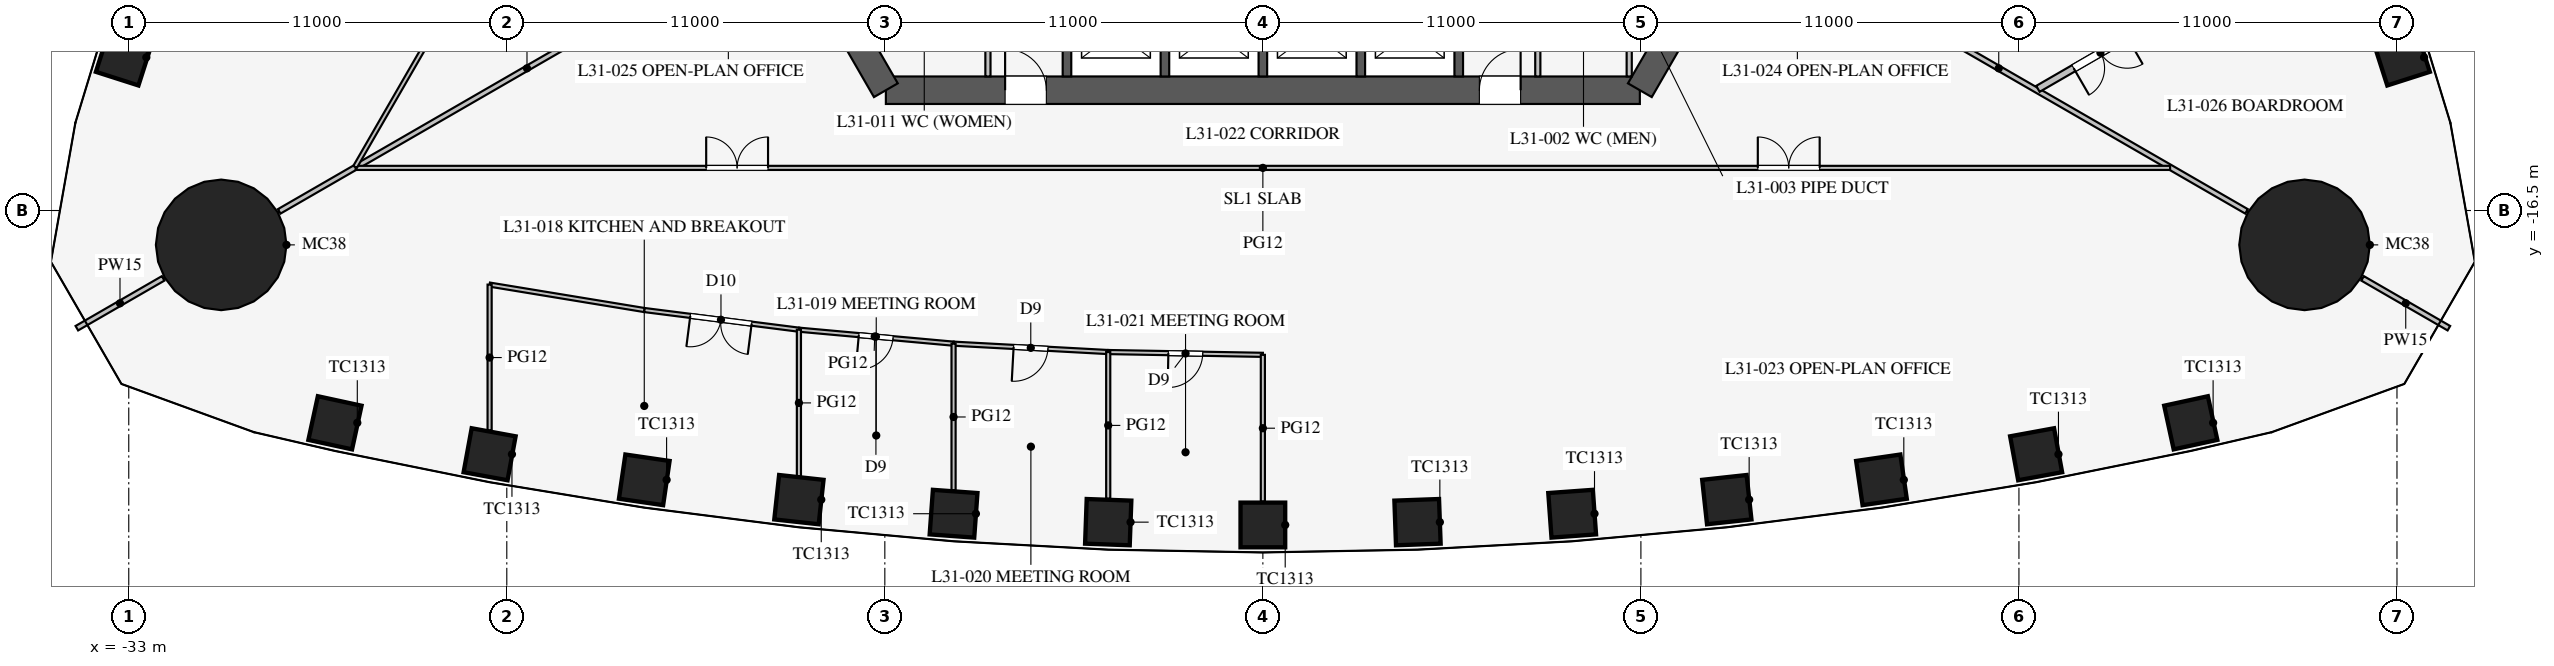
"""IFC4 building model, lengths in metres.
Left out: names, types, materials, properties, quantities, classifications, styles, units other than length and angle.
Written with IfcOpenShell. Run it as: python <this file> out.ifc"""

import sys

from ifc_helpers import new_model, si_unit, direction, frame, frame_2d, origin, origin_2d, place, context, subcontext, project, spatial, rectangle, circle, extrude, element, fill, save


model = new_model("IFC4")
c1 = context("Model", 3, precision=1e-05, world=origin(), true_north=direction((0.0, 1.0)))
c2 = subcontext(c1, "Body", "Model", "MODEL_VIEW")
j1 = project(units=[si_unit("LENGTHUNIT", "METRE"), si_unit("PLANEANGLEUNIT", "RADIAN")], contexts=[c1])
p1 = place(None, origin())
s1 = spatial("IfcSite", under=j1, at=p1, CompositionType="ELEMENT")
p2 = place(p1, origin())
s2 = spatial("IfcBuilding", under=s1, at=p2, CompositionType="ELEMENT")
p3 = place(p2, frame((0.0, 0.0, 136.7)))
s3 = spatial("IfcBuildingStorey", under=s2, at=p3, CompositionType="ELEMENT", Elevation=136.7)
for number, where, z_axis, x_axis in (
    (1, (-27.0, -22.677, 0.0), (0.0, 0.0, 1.0), (0.977, -0.212, 0.0)),
    (2, (-22.5, -23.593, 0.0), (0.0, 0.0, 1.0), (0.984, -0.18, 0.0)),
    (3, (-18.0, -24.337, 0.0), (0.0, 0.0, 1.0), (0.99, -0.144, 0.0)),
    (4, (-13.5, -24.913, 0.0), (0.0, 0.0, 1.0), (0.994, -0.108, 0.0)),
    (5, (-9.0, -25.323, 0.0), (0.0, 0.0, 1.0), (0.997, -0.072, 0.0)),
    (6, (-4.5, -25.568, 0.0), (0.0, 0.0, 1.0), (0.999, -0.036, 0.0)),
    (7, (0.0, -25.65, 0.0), (0.0, 0.0, 1.0), (1.0, 0.0, 0.0)),
    (8, (4.5, -25.568, 0.0), (0.0, 0.0, 1.0), (0.999, 0.036, 0.0)),
    (9, (9.0, -25.323, 0.0), (0.0, 0.0, 1.0), (0.997, 0.072, 0.0)),
    (10, (13.5, -24.913, 0.0), (0.0, 0.0, 1.0), (0.994, 0.108, 0.0)),
    (11, (18.0, -24.337, 0.0), (0.0, 0.0, 1.0), (0.99, 0.144, 0.0)),
    (12, (22.5, -23.593, 0.0), (0.0, 0.0, 1.0), (0.984, 0.18, 0.0)),
    (13, (27.0, -22.677, 0.0), (0.0, 0.0, 1.0), (0.977, 0.212, 0.0)),
    (14, (33.139, -12.044, 0.0), (0.0, 0.0, 1.0), (-0.305, 0.952, 0.0)),
    (15, (-33.139, -12.044, 0.0), (0.0, 0.0, 1.0), (-0.305, -0.952, 0.0)),
):
    element("IfcColumn", number, at=place(p3, frame(where, z_axis=z_axis, x_axis=x_axis)), inside=s3, PredefinedType="COLUMN", context=c2, shape_type="SweptSolid", body=[
        extrude(rectangle(XDim=1.3, YDim=1.3, at=origin_2d()), origin(), (0.0, 0.0, 1.0), 4.2),
    ])
for number, where, z_axis, x_axis in (
    (16, (30.311, -17.5, 0.0), (0.0, 0.0, 1.0), (1.0, 0.0, 0.0)),
    (17, (-30.311, -17.5, 0.0), (0.0, 0.0, 1.0), (1.0, 0.0, 0.0)),
):
    element("IfcColumn", number, at=place(p3, frame(where, z_axis=z_axis, x_axis=x_axis)), inside=s3, PredefinedType="COLUMN", context=c2, shape_type="SweptSolid", body=[
        extrude(circle(Radius=1.9, at=origin_2d()), origin(), (0.0, 0.0, 1.0), 4.2),
    ])
p4 = place(p3, frame((-10.97, -13.0, 0.0), z_axis=(0.0, 0.0, 1.0), x_axis=(1.0, 0.0, 0.0)))
e18 = element("IfcWall", 18, at=p4, inside=s3, PredefinedType="SHEAR", context=c2, shape_type="SweptSolid", body=[
    extrude(rectangle(XDim=21.939, YDim=0.8, at=frame_2d((10.97, 0.0))), origin(), (0.0, 0.0, 1.0), 4.2),
])
p5 = place(p4, frame((17.27, 0.0, 0.0)))
e19 = element("IfcOpeningElement", 19, at=p5, cuts=e18, PredefinedType="OPENING", context=c2, shape_type="SweptSolid", body=[
    extrude(rectangle(XDim=1.2, YDim=2.1, at=frame_2d((0.6, 1.05))), frame((0.0, 0.41, 0.0), z_axis=(0.0, -1.0, 0.0), x_axis=(1.0, 0.0, 0.0)), (0.0, 0.0, 1.0), 0.82),
])
p6 = place(p4, frame((3.47, 0.0, 0.0)))
e20 = element("IfcOpeningElement", 20, at=p6, cuts=e18, PredefinedType="OPENING", context=c2, shape_type="SweptSolid", body=[
    extrude(rectangle(XDim=1.2, YDim=2.1, at=frame_2d((0.6, 1.05))), frame((0.0, 0.41, 0.0), z_axis=(0.0, -1.0, 0.0), x_axis=(1.0, 0.0, 0.0)), (0.0, 0.0, 1.0), 0.82),
])
for number, where, z_axis, x_axis in (
    (21, (10.97, -13.0, 0.0), (0.0, 0.0, 1.0), (0.5, 0.866, 0.0)),
    (22, (-16.743, -3.0, 0.0), (0.0, 0.0, 1.0), (0.5, -0.866, 0.0)),
):
    element("IfcWall", number, at=place(p3, frame(where, z_axis=z_axis, x_axis=x_axis)), inside=s3, PredefinedType="SHEAR", context=c2, shape_type="SweptSolid", body=[
        extrude(rectangle(XDim=11.547, YDim=0.8, at=frame_2d((5.773, 0.0))), origin(), (0.0, 0.0, 1.0), 4.2),
    ])
for number, where, z_axis, x_axis in (
    (23, (-5.7, -10.025, 0.0), (0.0, 0.0, 1.0), (0.0, -1.0, 0.0)),
    (24, (-2.85, -10.025, 0.0), (0.0, 0.0, 1.0), (0.0, -1.0, 0.0)),
    (25, (0.0, -10.025, 0.0), (0.0, 0.0, 1.0), (0.0, -1.0, 0.0)),
    (26, (2.85, -10.025, 0.0), (0.0, 0.0, 1.0), (0.0, -1.0, 0.0)),
    (27, (5.7, -10.025, 0.0), (0.0, 0.0, 1.0), (0.0, -1.0, 0.0)),
):
    element("IfcWall", number, at=place(p3, frame(where, z_axis=z_axis, x_axis=x_axis)), inside=s3, PredefinedType="SHEAR", context=c2, shape_type="SweptSolid", body=[
        extrude(rectangle(XDim=2.575, YDim=0.25, at=frame_2d((1.288, 0.0))), origin(), (0.0, 0.0, 1.0), 4.2),
    ])
p7 = place(p3, frame((8.0, -7.5, 0.0), z_axis=(0.0, 0.0, 1.0), x_axis=(0.0, -1.0, 0.0)))
e28 = element("IfcWall", 28, at=p7, inside=s3, PredefinedType="PARTITIONING", context=c2, shape_type="SweptSolid", body=[
    extrude(rectangle(XDim=5.1, YDim=0.15, at=frame_2d((2.55, 0.0))), origin(), (0.0, 0.0, 1.0), 4.0),
])
p8 = place(p7, frame((1.3, 0.0, 0.0)))
e29 = element("IfcOpeningElement", 29, at=p8, cuts=e28, PredefinedType="OPENING", context=c2, shape_type="SweptSolid", body=[
    extrude(rectangle(XDim=0.9, YDim=2.1, at=frame_2d((0.45, 1.05))), frame((0.0, 0.085, 0.0), z_axis=(0.0, -1.0, 0.0), x_axis=(1.0, 0.0, 0.0)), (0.0, 0.0, 1.0), 0.17),
])
p9 = place(p3, frame((-8.0, -7.5, 0.0), z_axis=(0.0, 0.0, 1.0), x_axis=(0.0, -1.0, 0.0)))
e30 = element("IfcWall", 30, at=p9, inside=s3, PredefinedType="PARTITIONING", context=c2, shape_type="SweptSolid", body=[
    extrude(rectangle(XDim=5.1, YDim=0.15, at=frame_2d((2.55, 0.0))), origin(), (0.0, 0.0, 1.0), 4.0),
])
p10 = place(p9, frame((2.6, 0.0, 0.0)))
e31 = element("IfcOpeningElement", 31, at=p10, cuts=e30, PredefinedType="OPENING", context=c2, shape_type="SweptSolid", body=[
    extrude(rectangle(XDim=0.9, YDim=2.1, at=frame_2d((0.45, 1.05))), frame((0.0, 0.085, 0.0), z_axis=(0.0, -1.0, 0.0), x_axis=(1.0, 0.0, 0.0)), (0.0, 0.0, 1.0), 0.17),
])
p11 = place(p3, frame((10.66, -8.5, 0.0), z_axis=(0.0, 0.0, 1.0), x_axis=(0.0, -1.0, 0.0)))
e32 = element("IfcWall", 32, at=p11, inside=s3, PredefinedType="PARTITIONING", context=c2, shape_type="SweptSolid", body=[
    extrude(rectangle(XDim=4.1, YDim=0.15, at=frame_2d((2.05, 0.0))), origin(), (0.0, 0.0, 1.0), 4.0),
])
p12 = place(p3, frame((14.203, -8.2, 0.0), z_axis=(0.0, 0.0, 1.0), x_axis=(0.866024668836, -0.500001272966, 0.0)))
e33 = element("IfcWall", 33, at=p12, inside=s3, PredefinedType="PARTITIONING", context=c2, shape_type="SweptSolid", body=[
    extrude(rectangle(XDim=16.65, YDim=0.15, at=frame_2d((8.325, 0.0))), origin(), (0.0, 0.0, 1.0), 2.3),
])
p13 = place(p3, frame((32.0, -18.475, 0.0), z_axis=(0.0, 0.0, 1.0), x_axis=(0.866042548026, -0.499970304126, 0.0)))
e34 = element("IfcWall", 34, at=p13, inside=s3, PredefinedType="PARTITIONING", context=c2, shape_type="SweptSolid", body=[
    extrude(rectangle(XDim=2.899, YDim=0.15, at=frame_2d((1.45, 0.0))), origin(), (0.0, 0.0, 1.0), 2.3),
])
p14 = place(p3, frame((-14.203, -8.2, 0.0), z_axis=(0.0, 0.0, 1.0), x_axis=(-0.866024668836, -0.500001272966, 0.0)))
e35 = element("IfcWall", 35, at=p14, inside=s3, PredefinedType="PARTITIONING", context=c2, shape_type="SweptSolid", body=[
    extrude(rectangle(XDim=16.65, YDim=0.15, at=frame_2d((8.325, 0.0))), origin(), (0.0, 0.0, 1.0), 2.3),
])
p15 = place(p3, frame((-32.0, -18.475, 0.0), z_axis=(0.0, 0.0, 1.0), x_axis=(-0.866042548026, -0.499970304126, 0.0)))
e36 = element("IfcWall", 36, at=p15, inside=s3, PredefinedType="PARTITIONING", context=c2, shape_type="SweptSolid", body=[
    extrude(rectangle(XDim=2.899, YDim=0.15, at=frame_2d((1.45, 0.0))), origin(), (0.0, 0.0, 1.0), 2.3),
])
p16 = place(p3, frame((-26.398, -15.26, 0.0), z_axis=(0.0, 0.0, 1.0), x_axis=(1.0, 0.0, 0.0)))
e37 = element("IfcWall", 37, at=p16, inside=s3, PredefinedType="PARTITIONING", context=c2, shape_type="SweptSolid", body=[
    extrude(rectangle(XDim=52.796, YDim=0.12, at=frame_2d((26.398, 0.0))), origin(), (0.0, 0.0, 1.0), 2.9),
])
p17 = place(p16, frame((10.2, 0.0, 0.15)))
e38 = element("IfcOpeningElement", 38, at=p17, cuts=e37, PredefinedType="OPENING", context=c2, shape_type="SweptSolid", body=[
    extrude(rectangle(XDim=1.8, YDim=2.1, at=frame_2d((0.9, 1.05))), frame((0.0, 0.07, 0.0), z_axis=(0.0, -1.0, 0.0), x_axis=(1.0, 0.0, 0.0)), (0.0, 0.0, 1.0), 0.14),
])
p18 = place(p16, frame((40.8, 0.0, 0.15)))
e39 = element("IfcOpeningElement", 39, at=p18, cuts=e37, PredefinedType="OPENING", context=c2, shape_type="SweptSolid", body=[
    extrude(rectangle(XDim=1.8, YDim=2.1, at=frame_2d((0.9, 1.05))), frame((0.0, 0.07, 0.0), z_axis=(0.0, -1.0, 0.0), x_axis=(1.0, 0.0, 0.0)), (0.0, 0.0, 1.0), 0.14),
])
p19 = place(p3, frame((-13.5, -19.968, 0.0), z_axis=(0.0, 0.0, 1.0), x_axis=(0.995930325215, -0.090126507295, 0.0)))
e40 = element("IfcWall", 40, at=p19, inside=s3, PredefinedType="PARTITIONING", context=c2, shape_type="SweptSolid", body=[
    extrude(rectangle(XDim=4.518, YDim=0.12, at=frame_2d((2.259, 0.0))), origin(), (0.0, 0.0, 1.0), 2.9),
])
p20 = place(p19, frame((1.75, 0.0, 0.15)))
e41 = element("IfcOpeningElement", 41, at=p20, cuts=e40, PredefinedType="OPENING", context=c2, shape_type="SweptSolid", body=[
    extrude(rectangle(XDim=1.0, YDim=2.1, at=frame_2d((0.5, 1.05))), frame((0.0, 0.07, 0.0), z_axis=(0.0, -1.0, 0.0), x_axis=(1.0, 0.0, 0.0)), (0.0, 0.0, 1.0), 0.14),
])
p21 = place(p3, frame((-18.0, -19.396, 0.0), z_axis=(0.0, 0.0, 1.0), x_axis=(0.992010652594, -0.12615413247, 0.0)))
e42 = element("IfcWall", 42, at=p21, inside=s3, PredefinedType="PARTITIONING", context=c2, shape_type="SweptSolid", body=[
    extrude(rectangle(XDim=4.536, YDim=0.12, at=frame_2d((2.268, 0.0))), origin(), (0.0, 0.0, 1.0), 2.9),
])
p22 = place(p21, frame((1.35, 0.0, 0.15)))
e43 = element("IfcOpeningElement", 43, at=p22, cuts=e42, PredefinedType="OPENING", context=c2, shape_type="SweptSolid", body=[
    extrude(rectangle(XDim=1.8, YDim=2.1, at=frame_2d((0.9, 1.05))), frame((0.0, 0.07, 0.0), z_axis=(0.0, -1.0, 0.0), x_axis=(1.0, 0.0, 0.0)), (0.0, 0.0, 1.0), 0.14),
])
p23 = place(p3, frame((-22.5, -18.656, 0.0), z_axis=(0.0, 0.0, 1.0), x_axis=(0.986764681833, -0.162158757664, 0.0)))
e44 = element("IfcWall", 44, at=p23, inside=s3, PredefinedType="PARTITIONING", context=c2, shape_type="SweptSolid", body=[
    extrude(rectangle(XDim=4.56, YDim=0.12, at=frame_2d((2.28, 0.0))), origin(), (0.0, 0.0, 1.0), 2.9),
])
p24 = place(p3, frame((-4.5, -20.619, 0.0), z_axis=(0.0, 0.0, 1.0), x_axis=(0.999837820638, -0.018009231578, 0.0)))
e45 = element("IfcWall", 45, at=p24, inside=s3, PredefinedType="PARTITIONING", context=c2, shape_type="SweptSolid", body=[
    extrude(rectangle(XDim=4.501, YDim=0.12, at=frame_2d((2.25, 0.0))), origin(), (0.0, 0.0, 1.0), 2.9),
])
p25 = place(p24, frame((1.75, 0.0, 0.15)))
e46 = element("IfcOpeningElement", 46, at=p25, cuts=e45, PredefinedType="OPENING", context=c2, shape_type="SweptSolid", body=[
    extrude(rectangle(XDim=1.0, YDim=2.1, at=frame_2d((0.5, 1.05))), frame((0.0, 0.07, 0.0), z_axis=(0.0, -1.0, 0.0), x_axis=(1.0, 0.0, 0.0)), (0.0, 0.0, 1.0), 0.14),
])
p26 = place(p3, frame((-9.0, -20.375, 0.0), z_axis=(0.0, 0.0, 1.0), x_axis=(0.998537376538, -0.054065771581, 0.0)))
e47 = element("IfcWall", 47, at=p26, inside=s3, PredefinedType="PARTITIONING", context=c2, shape_type="SweptSolid", body=[
    extrude(rectangle(XDim=4.507, YDim=0.12, at=frame_2d((2.253, 0.0))), origin(), (0.0, 0.0, 1.0), 2.9),
])
p27 = place(p26, frame((1.75, 0.0, 0.15)))
e48 = element("IfcOpeningElement", 48, at=p27, cuts=e47, PredefinedType="OPENING", context=c2, shape_type="SweptSolid", body=[
    extrude(rectangle(XDim=1.0, YDim=2.1, at=frame_2d((0.5, 1.05))), frame((0.0, 0.07, 0.0), z_axis=(0.0, -1.0, 0.0), x_axis=(1.0, 0.0, 0.0)), (0.0, 0.0, 1.0), 0.14),
])
p28 = place(p3, frame((0.0, -20.7, 0.0), z_axis=(0.0, 0.0, 1.0), x_axis=(0.0, -1.0, 0.0)))
e49 = element("IfcWall", 49, at=p28, inside=s3, PredefinedType="PARTITIONING", context=c2, shape_type="SweptSolid", body=[
    extrude(rectangle(XDim=4.27, YDim=0.12, at=frame_2d((2.135, 0.0))), origin(), (0.0, 0.0, 1.0), 2.9),
])
p29 = place(p3, frame((-13.5, -19.968, 0.0), z_axis=(0.0, 0.0, 1.0), x_axis=(0.0, -1.0, 0.0)))
e50 = element("IfcWall", 50, at=p29, inside=s3, PredefinedType="PARTITIONING", context=c2, shape_type="SweptSolid", body=[
    extrude(rectangle(XDim=4.261, YDim=0.12, at=frame_2d((2.131, 0.0))), origin(), (0.0, 0.0, 1.0), 2.9),
])
p30 = place(p3, frame((-22.5, -18.656, 0.0), z_axis=(0.0, 0.0, 1.0), x_axis=(0.0, -1.0, 0.0)))
e51 = element("IfcWall", 51, at=p30, inside=s3, PredefinedType="PARTITIONING", context=c2, shape_type="SweptSolid", body=[
    extrude(rectangle(XDim=4.245, YDim=0.12, at=frame_2d((2.123, 0.0))), origin(), (0.0, 0.0, 1.0), 2.9),
])
p31 = place(p3, frame((-4.5, -20.619, 0.0), z_axis=(0.0, 0.0, 1.0), x_axis=(0.0, -1.0, 0.0)))
e52 = element("IfcWall", 52, at=p31, inside=s3, PredefinedType="PARTITIONING", context=c2, shape_type="SweptSolid", body=[
    extrude(rectangle(XDim=4.269, YDim=0.12, at=frame_2d((2.135, 0.0))), origin(), (0.0, 0.0, 1.0), 2.9),
])
p32 = place(p3, frame((-9.0, -20.375, 0.0), z_axis=(0.0, 0.0, 1.0), x_axis=(0.0, -1.0, 0.0)))
e53 = element("IfcWall", 53, at=p32, inside=s3, PredefinedType="PARTITIONING", context=c2, shape_type="SweptSolid", body=[
    extrude(rectangle(XDim=4.266, YDim=0.12, at=frame_2d((2.133, 0.0))), origin(), (0.0, 0.0, 1.0), 2.9),
])
p33 = place(p3, frame((22.553, -12.96, 0.0), z_axis=(0.0, 0.0, 1.0), x_axis=(0.86603204091, 0.499988503985, 0.0)))
e54 = element("IfcWall", 54, at=p33, inside=s3, PredefinedType="PARTITIONING", context=c2, shape_type="SweptSolid", body=[
    extrude(rectangle(XDim=9.85, YDim=0.2, at=frame_2d((4.925, 0.0))), origin(), (0.0, 0.0, 1.0), 2.9),
])
p34 = place(p33, frame((1.2, 0.0, 0.15)))
e55 = element("IfcOpeningElement", 55, at=p34, cuts=e54, PredefinedType="OPENING", context=c2, shape_type="SweptSolid", body=[
    extrude(rectangle(XDim=1.8, YDim=2.1, at=frame_2d((0.9, 1.05))), frame((0.0, 0.11, 0.0), z_axis=(0.0, -1.0, 0.0), x_axis=(1.0, 0.0, 0.0)), (0.0, 0.0, 1.0), 0.22),
])
p35 = place(p3, frame((-0.016, 30.491, 0.0), z_axis=(0.0, 0.0, 1.0), x_axis=(-0.50000091641, -0.866024874695, 0.0)))
e56 = element("IfcWall", 56, at=p35, inside=s3, PredefinedType="PARTITIONING", context=c2, shape_type="SweptSolid", body=[
    extrude(rectangle(XDim=52.796, YDim=0.12, at=frame_2d((26.398, 0.0))), origin(), (0.0, 0.0, 1.0), 2.9),
])
p36 = place(p35, frame((10.2, 0.0, 0.15)))
e57 = element("IfcOpeningElement", 57, at=p36, cuts=e56, PredefinedType="OPENING", context=c2, shape_type="SweptSolid", body=[
    extrude(rectangle(XDim=1.8, YDim=2.1, at=frame_2d((0.9, 1.05))), frame((0.0, 0.07, 0.0), z_axis=(0.0, -1.0, 0.0), x_axis=(1.0, 0.0, 0.0)), (0.0, 0.0, 1.0), 0.14),
])
p37 = place(p35, frame((40.8, 0.0, 0.15)))
e58 = element("IfcOpeningElement", 58, at=p37, cuts=e56, PredefinedType="OPENING", context=c2, shape_type="SweptSolid", body=[
    extrude(rectangle(XDim=1.8, YDim=2.1, at=frame_2d((0.9, 1.05))), frame((0.0, 0.07, 0.0), z_axis=(0.0, -1.0, 0.0), x_axis=(1.0, 0.0, 0.0)), (0.0, 0.0, 1.0), 0.14),
])
p38 = place(p5, origin())
e59 = element("IfcDoor", 59, at=p38, inside=s3, OperationType="SINGLE_SWING_RIGHT", PredefinedType="DOOR", context=c2, shape_type="SweptSolid", body=[
    extrude(rectangle(XDim=1.2, YDim=2.1, at=frame_2d((0.6, 1.05))), frame((0.0, 0.025, 0.0), z_axis=(0.0, -1.0, 0.0), x_axis=(1.0, 0.0, 0.0)), (0.0, 0.0, 1.0), 0.05),
])
fill(e19, e59)
p39 = place(p6, origin())
e60 = element("IfcDoor", 60, at=p39, inside=s3, OperationType="SINGLE_SWING_LEFT", PredefinedType="DOOR", context=c2, shape_type="SweptSolid", body=[
    extrude(rectangle(XDim=1.2, YDim=2.1, at=frame_2d((0.6, 1.05))), frame((0.0, 0.025, 0.0), z_axis=(0.0, -1.0, 0.0), x_axis=(1.0, 0.0, 0.0)), (0.0, 0.0, 1.0), 0.05),
])
fill(e20, e60)
p40 = place(p22, frame((1.8, 0.0, 0.0), z_axis=(0.0, 0.0, 1.0), x_axis=(-1.0, 0.0, 0.0)))
e61 = element("IfcDoor", 61, at=p40, inside=s3, OperationType="DOUBLE_DOOR_SINGLE_SWING", PredefinedType="DOOR", context=c2, shape_type="SweptSolid", body=[
    extrude(rectangle(XDim=1.8, YDim=2.1, at=frame_2d((0.9, 1.05))), frame((0.0, 0.025, 0.0), z_axis=(0.0, -1.0, 0.0), x_axis=(1.0, 0.0, 0.0)), (0.0, 0.0, 1.0), 0.05),
])
fill(e43, e61)
p41 = place(p20, frame((1.0, 0.0, 0.0), z_axis=(0.0, 0.0, 1.0), x_axis=(-1.0, 0.0, 0.0)))
e62 = element("IfcDoor", 62, at=p41, inside=s3, OperationType="SINGLE_SWING_RIGHT", PredefinedType="DOOR", context=c2, shape_type="SweptSolid", body=[
    extrude(rectangle(XDim=1.0, YDim=2.1, at=frame_2d((0.5, 1.05))), frame((0.0, 0.025, 0.0), z_axis=(0.0, -1.0, 0.0), x_axis=(1.0, 0.0, 0.0)), (0.0, 0.0, 1.0), 0.05),
])
fill(e41, e62)
p42 = place(p27, frame((1.0, 0.0, 0.0), z_axis=(0.0, 0.0, 1.0), x_axis=(-1.0, 0.0, 0.0)))
e63 = element("IfcDoor", 63, at=p42, inside=s3, OperationType="SINGLE_SWING_RIGHT", PredefinedType="DOOR", context=c2, shape_type="SweptSolid", body=[
    extrude(rectangle(XDim=1.0, YDim=2.1, at=frame_2d((0.5, 1.05))), frame((0.0, 0.025, 0.0), z_axis=(0.0, -1.0, 0.0), x_axis=(1.0, 0.0, 0.0)), (0.0, 0.0, 1.0), 0.05),
])
fill(e48, e63)
p43 = place(p25, frame((1.0, 0.0, 0.0), z_axis=(0.0, 0.0, 1.0), x_axis=(-1.0, 0.0, 0.0)))
e64 = element("IfcDoor", 64, at=p43, inside=s3, OperationType="SINGLE_SWING_RIGHT", PredefinedType="DOOR", context=c2, shape_type="SweptSolid", body=[
    extrude(rectangle(XDim=1.0, YDim=2.1, at=frame_2d((0.5, 1.05))), frame((0.0, 0.025, 0.0), z_axis=(0.0, -1.0, 0.0), x_axis=(1.0, 0.0, 0.0)), (0.0, 0.0, 1.0), 0.05),
])
fill(e46, e64)
p44 = place(p17, origin())
e65 = element("IfcDoor", 65, at=p44, inside=s3, OperationType="DOUBLE_DOOR_SINGLE_SWING", PredefinedType="DOOR", context=c2, shape_type="SweptSolid", body=[
    extrude(rectangle(XDim=1.8, YDim=2.1, at=frame_2d((0.9, 1.05))), frame((0.0, 0.025, 0.0), z_axis=(0.0, -1.0, 0.0), x_axis=(1.0, 0.0, 0.0)), (0.0, 0.0, 1.0), 0.05),
])
fill(e38, e65)
p45 = place(p18, origin())
e66 = element("IfcDoor", 66, at=p45, inside=s3, OperationType="DOUBLE_DOOR_SINGLE_SWING", PredefinedType="DOOR", context=c2, shape_type="SweptSolid", body=[
    extrude(rectangle(XDim=1.8, YDim=2.1, at=frame_2d((0.9, 1.05))), frame((0.0, 0.025, 0.0), z_axis=(0.0, -1.0, 0.0), x_axis=(1.0, 0.0, 0.0)), (0.0, 0.0, 1.0), 0.05),
])
fill(e39, e66)
p46 = place(p34, frame((1.8, 0.0, 0.0), z_axis=(0.0, 0.0, 1.0), x_axis=(-1.0, 0.0, 0.0)))
e67 = element("IfcDoor", 67, at=p46, inside=s3, OperationType="DOUBLE_DOOR_SINGLE_SWING", PredefinedType="DOOR", context=c2, shape_type="SweptSolid", body=[
    extrude(rectangle(XDim=1.8, YDim=2.1, at=frame_2d((0.9, 1.05))), frame((0.0, 0.025, 0.0), z_axis=(0.0, -1.0, 0.0), x_axis=(1.0, 0.0, 0.0)), (0.0, 0.0, 1.0), 0.05),
])
fill(e55, e67)
save(model, sys.argv[1])
